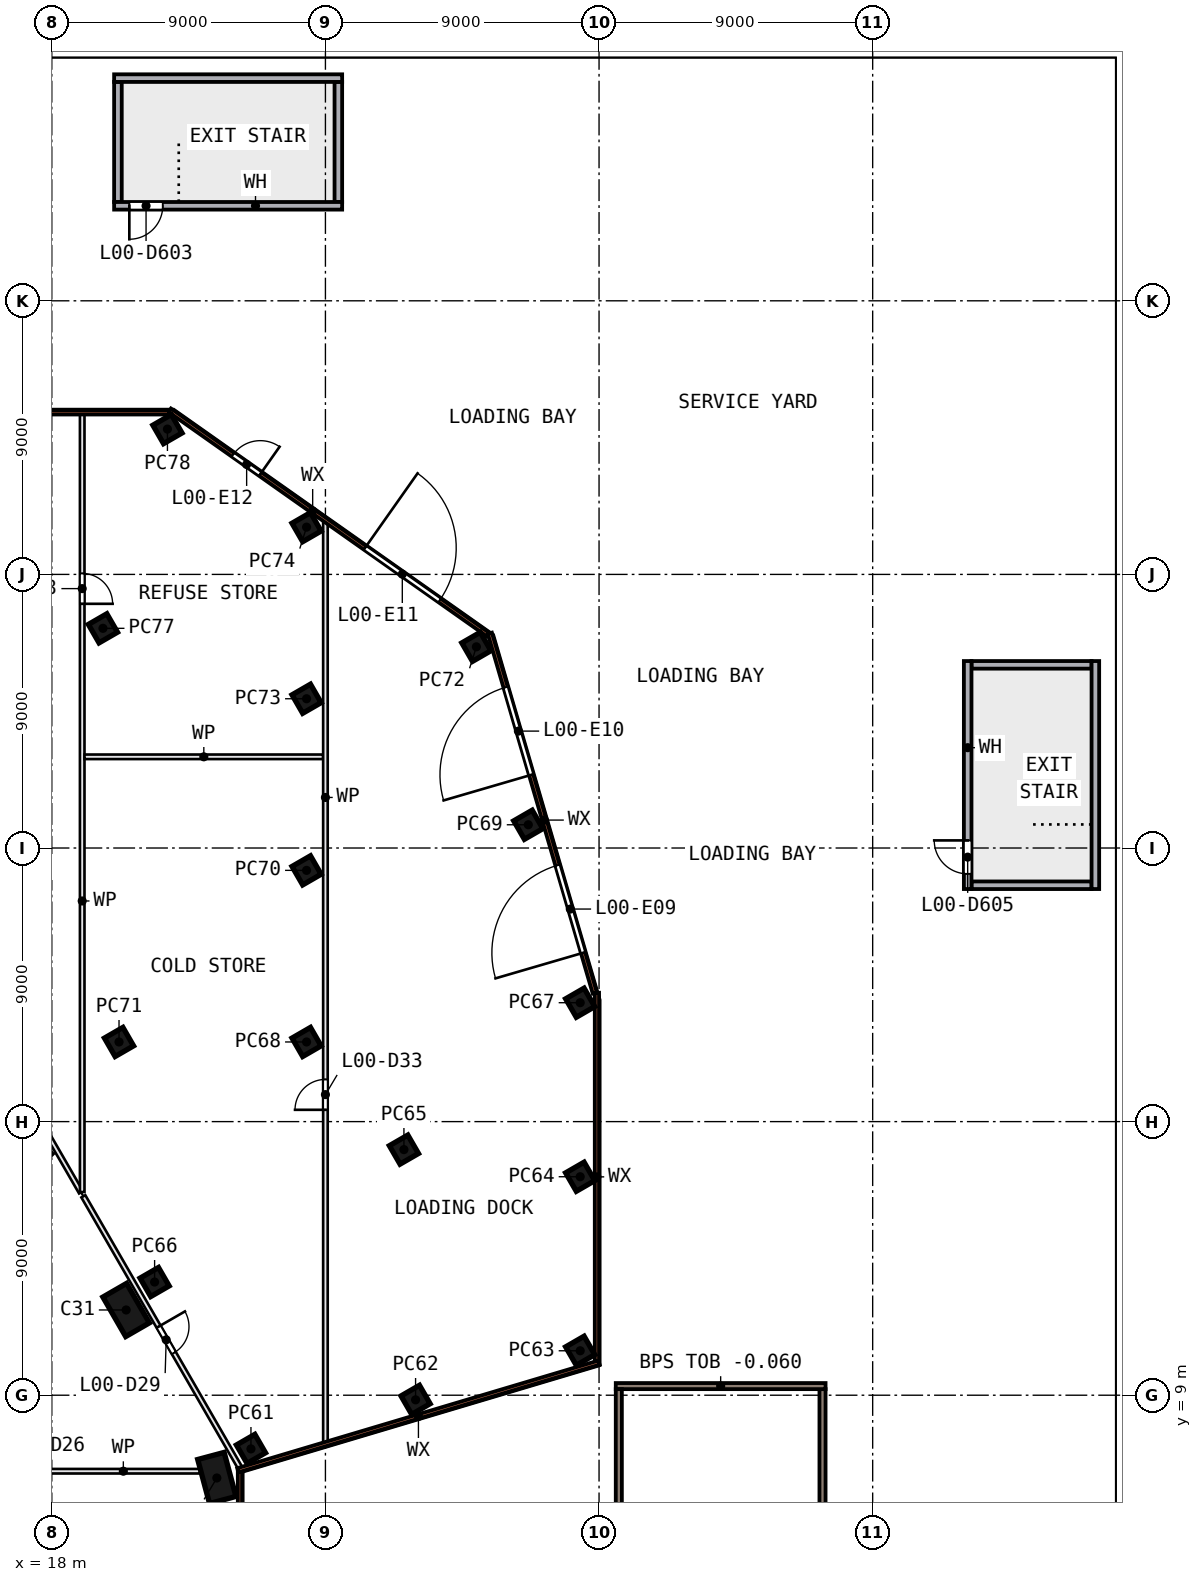
"""IFC4 building model, lengths in metres.
Left out: names, types, materials, properties, quantities, classifications, styles, units other than length and angle.
Written with IfcOpenShell. Run it as: python <this file> out.ifc"""

import sys

from ifc_helpers import new_model, si_unit, direction, frame, frame_2d, origin, origin_2d, place, context, subcontext, project, spatial, rectangle, extrude, element, fill, save


model = new_model("IFC4")
c1 = context("Model", 3, precision=1e-05, world=origin(), true_north=direction((0.0, 1.0)))
c2 = subcontext(c1, "Body", "Model", "MODEL_VIEW")
j1 = project(units=[si_unit("LENGTHUNIT", "METRE"), si_unit("PLANEANGLEUNIT", "RADIAN")], contexts=[c1])
p1 = place(None, origin())
s1 = spatial("IfcSite", under=j1, at=p1, CompositionType="ELEMENT")
p2 = place(p1, origin())
s2 = spatial("IfcBuilding", under=s1, at=p2, CompositionType="ELEMENT")
p3 = place(p2, origin())
s3 = spatial("IfcBuildingStorey", under=s2, at=p3, CompositionType="ELEMENT", Elevation=0.0)
for number, where, z_axis, x_axis in (
    (1, (23.428, 6.278, 0.0), (0.0, 0.0, 1.0), (0.259, -0.966, 0.0)),
    (2, (20.445, 11.804, 0.0), (0.0, 0.0, 1.0), (-0.5, 0.866, 0.0)),
):
    element("IfcColumn", number, at=place(p3, frame(where, z_axis=z_axis, x_axis=x_axis)), inside=s3, PredefinedType="COLUMN", context=c2, shape_type="SweptSolid", body=[
        extrude(rectangle(XDim=1.5, YDim=0.9, at=origin_2d()), origin(), (0.0, 0.0, 1.0), 7.55),
    ])
for number, where, z_axis, x_axis in (
    (3, (24.55, 7.234, 0.0), (0.0, 0.0, 1.0), (0.866, 0.5, 0.0)),
    (4, (29.965, 8.848, 0.0), (0.0, 0.0, 1.0), (0.866, 0.5, 0.0)),
    (5, (35.38, 10.462, 0.0), (0.0, 0.0, 1.0), (0.866, 0.5, 0.0)),
    (6, (35.38, 16.187, 0.0), (0.0, 0.0, 1.0), (0.866, 0.5, 0.0)),
    (7, (29.582, 17.079, 0.0), (0.0, 0.0, 1.0), (0.866, 0.5, 0.0)),
    (8, (21.381, 12.723, 0.0), (0.0, 0.0, 1.0), (0.866, 0.5, 0.0)),
    (9, (35.38, 21.911, 0.0), (0.0, 0.0, 1.0), (0.866, 0.5, 0.0)),
    (10, (26.38, 20.62, 0.0), (0.0, 0.0, 1.0), (0.866, 0.5, 0.0)),
    (11, (33.673, 27.765, 0.0), (0.0, 0.0, 1.0), (0.866, 0.5, 0.0)),
    (12, (26.38, 26.265, 0.0), (0.0, 0.0, 1.0), (0.866, 0.5, 0.0)),
    (13, (20.211, 20.62, 0.0), (0.0, 0.0, 1.0), (0.866, 0.5, 0.0)),
    (14, (31.966, 33.618, 0.0), (0.0, 0.0, 1.0), (0.866, 0.5, 0.0)),
    (15, (26.38, 31.91, 0.0), (0.0, 0.0, 1.0), (0.866, 0.5, 0.0)),
    (16, (26.38, 37.555, 0.0), (0.0, 0.0, 1.0), (0.866, 0.5, 0.0)),
    (17, (19.682, 34.227, 0.0), (0.0, 0.0, 1.0), (0.866, 0.5, 0.0)),
    (18, (21.803, 40.78, 0.0), (0.0, 0.0, 1.0), (0.866, 0.5, 0.0)),
):
    element("IfcColumn", number, at=place(p3, frame(where, z_axis=z_axis, x_axis=x_axis)), inside=s3, PredefinedType="COLUMN", context=c2, shape_type="SweptSolid", body=[
        extrude(rectangle(XDim=0.7, YDim=0.7, at=origin_2d()), origin(), (0.0, 0.0, 1.0), 8.0),
    ])
for number, where, z_axis, x_axis in (
    (19, (36.65, -9.5, -0.06), (0.0, 0.0, 1.0), (0.0, 1.0, 0.0)),
    (20, (43.35, -9.5, -0.06), (0.0, 0.0, 1.0), (0.0, 1.0, 0.0)),
):
    element("IfcWall", number, at=place(p3, frame(where, z_axis=z_axis, x_axis=x_axis)), inside=s3, PredefinedType="PARAPET", context=c2, shape_type="SweptSolid", body=[
        extrude(rectangle(XDim=18.7, YDim=0.2, at=frame_2d((9.35, 0.0))), origin(), (0.0, 0.0, 1.0), 1.18),
    ])
p4 = place(p3, frame((36.55, 9.3, -0.06), z_axis=(0.0, 0.0, 1.0), x_axis=(1.0, 0.0, 0.0)))
e21 = element("IfcWall", 21, at=p4, inside=s3, PredefinedType="PARAPET", context=c2, shape_type="SweptSolid", body=[
    extrude(rectangle(XDim=6.9, YDim=0.2, at=frame_2d((3.45, 0.0))), origin(), (0.0, 0.0, 1.0), 1.18),
])
p5 = place(p3, frame((24.188, 6.479, 0.0), z_axis=(0.0, 0.0, 1.0), x_axis=(0.0, -1.0, 0.0)))
e22 = element("IfcWall", 22, at=p5, inside=s3, PredefinedType="SOLIDWALL", context=c2, shape_type="SweptSolid", body=[
    extrude(rectangle(XDim=13.1, YDim=0.14, at=frame_2d((6.55, 0.0))), origin(), (0.0, 0.0, 1.0), 7.55),
])
p6 = place(p5, frame((9.29, 0.0, 0.0)))
e23 = element("IfcOpeningElement", 23, at=p6, cuts=e22, PredefinedType="OPENING", context=c2, shape_type="SweptSolid", body=[
    extrude(rectangle(XDim=1.1, YDim=2.4, at=frame_2d((0.55, 1.2))), frame((0.0, 0.08, 0.0), z_axis=(0.0, -1.0, 0.0), x_axis=(1.0, 0.0, 0.0)), (0.0, 0.0, 1.0), 0.16),
])
p7 = place(p3, frame((24.118, 6.531, 0.0), z_axis=(0.0, 0.0, 1.0), x_axis=(0.958329382, 0.28566553, 0.0)))
e24 = element("IfcWall", 24, at=p7, inside=s3, PredefinedType="SOLIDWALL", context=c2, shape_type="SweptSolid", body=[
    extrude(rectangle(XDim=12.398, YDim=0.14, at=frame_2d((6.199, 0.0))), origin(), (0.0, 0.0, 1.0), 7.55),
])
p8 = place(p3, frame((35.93, 10.125, 0.0), z_axis=(0.0, 0.0, 1.0), x_axis=(0.0, 1.0, 0.0)))
e25 = element("IfcWall", 25, at=p8, inside=s3, PredefinedType="SOLIDWALL", context=c2, shape_type="SweptSolid", body=[
    extrude(rectangle(XDim=12.115, YDim=0.14, at=frame_2d((6.057, 0.0))), origin(), (0.0, 0.0, 1.0), 7.55),
])
p9 = place(p3, frame((35.86, 22.23, 0.0), z_axis=(0.0, 0.0, 1.0), x_axis=(-0.280008365, 0.95999756, 0.0)))
e26 = element("IfcWall", 26, at=p9, inside=s3, PredefinedType="SOLIDWALL", context=c2, shape_type="SweptSolid", body=[
    extrude(rectangle(XDim=12.328, YDim=0.14, at=frame_2d((6.164, 0.0))), origin(), (0.0, 0.0, 1.0), 7.55),
])
p10 = place(p9, frame((1.377, 0.0, 0.0)))
e27 = element("IfcOpeningElement", 27, at=p10, cuts=e26, PredefinedType="OPENING", context=c2, shape_type="SweptSolid", body=[
    extrude(rectangle(XDim=3.0, YDim=4.6, at=frame_2d((1.5, 2.3))), frame((0.0, 0.08, 0.0), z_axis=(0.0, -1.0, 0.0), x_axis=(1.0, 0.0, 0.0)), (0.0, 0.0, 1.0), 0.16),
])
p11 = place(p9, frame((7.475, 0.0, 0.0)))
e28 = element("IfcOpeningElement", 28, at=p11, cuts=e26, PredefinedType="OPENING", context=c2, shape_type="SweptSolid", body=[
    extrude(rectangle(XDim=3.0, YDim=4.6, at=frame_2d((1.5, 2.3))), frame((0.0, 0.08, 0.0), z_axis=(0.0, -1.0, 0.0), x_axis=(1.0, 0.0, 0.0)), (0.0, 0.0, 1.0), 0.16),
])
p12 = place(p3, frame((21.878, 41.4, 0.0), z_axis=(0.0, 0.0, 1.0), x_axis=(0.817401857, -0.576067881, 0.0)))
e29 = element("IfcWall", 29, at=p12, inside=s3, PredefinedType="SOLIDWALL", context=c2, shape_type="SweptSolid", body=[
    extrude(rectangle(XDim=12.808, YDim=0.14, at=frame_2d((6.404, 0.0))), origin(), (0.0, 0.0, 1.0), 7.55),
])
p13 = place(p12, frame((7.859, 0.0, 0.0)))
e30 = element("IfcOpeningElement", 30, at=p13, cuts=e29, PredefinedType="OPENING", context=c2, shape_type="SweptSolid", body=[
    extrude(rectangle(XDim=3.0, YDim=4.6, at=frame_2d((1.5, 2.3))), frame((0.0, 0.08, 0.0), z_axis=(0.0, -1.0, 0.0), x_axis=(1.0, 0.0, 0.0)), (0.0, 0.0, 1.0), 0.16),
])
p14 = place(p12, frame((2.545, 0.0, 0.0)))
e31 = element("IfcOpeningElement", 31, at=p14, cuts=e29, PredefinedType="OPENING", context=c2, shape_type="SweptSolid", body=[
    extrude(rectangle(XDim=1.1, YDim=2.4, at=frame_2d((0.55, 1.2))), frame((0.0, 0.08, 0.0), z_axis=(0.0, -1.0, 0.0), x_axis=(1.0, 0.0, 0.0)), (0.0, 0.0, 1.0), 0.16),
])
p15 = place(p3, frame((4.7, 41.33, 0.0), z_axis=(0.0, 0.0, 1.0), x_axis=(1.0, 0.0, 0.0)))
e32 = element("IfcWall", 32, at=p15, inside=s3, PredefinedType="SOLIDWALL", context=c2, shape_type="SweptSolid", body=[
    extrude(rectangle(XDim=17.156, YDim=0.14, at=frame_2d((8.578, 0.0))), origin(), (0.0, 0.0, 1.0), 7.55),
])
p16 = place(p15, frame((4.317, 0.0, 0.0)))
e33 = element("IfcOpeningElement", 33, at=p16, cuts=e32, PredefinedType="OPENING", context=c2, shape_type="SweptSolid", body=[
    extrude(rectangle(XDim=1.1, YDim=2.4, at=frame_2d((0.55, 1.2))), frame((0.0, 0.08, 0.0), z_axis=(0.0, -1.0, 0.0), x_axis=(1.0, 0.0, 0.0)), (0.0, 0.0, 1.0), 0.16),
])
p17 = place(p3, frame((17.796, 17.693, 0.0), z_axis=(0.0, 0.0, 1.0), x_axis=(0.50002133, -0.866013088, 0.0)))
e34 = element("IfcWall", 34, at=p17, inside=s3, PredefinedType="PARTITIONING", context=c2, shape_type="SweptSolid", body=[
    extrude(rectangle(XDim=2.333, YDim=0.15, at=frame_2d((1.167, 0.0))), origin(), (0.0, 0.0, 1.0), 7.55),
])
p18 = place(p3, frame((19.0, 41.26, 0.0), z_axis=(0.0, 0.0, 1.0), x_axis=(0.0, -1.0, 0.0)))
e35 = element("IfcWall", 35, at=p18, inside=s3, PredefinedType="PARTITIONING", context=c2, shape_type="SweptSolid", body=[
    extrude(rectangle(XDim=25.577, YDim=0.15, at=frame_2d((12.789, 0.0))), origin(), (0.0, 0.0, 1.0), 7.55),
])
p19 = place(p18, frame((5.227, 0.0, 0.0)))
e36 = element("IfcOpeningElement", 36, at=p19, cuts=e35, PredefinedType="OPENING", context=c2, shape_type="SweptSolid", body=[
    extrude(rectangle(XDim=1.0, YDim=2.1, at=frame_2d((0.5, 1.05))), frame((0.0, 0.085, 0.0), z_axis=(0.0, -1.0, 0.0), x_axis=(1.0, 0.0, 0.0)), (0.0, 0.0, 1.0), 0.17),
])
p20 = place(p3, frame((19.037, 15.543, 0.0), z_axis=(0.0, 0.0, 1.0), x_axis=(0.499986809, -0.866033019, 0.0)))
e37 = element("IfcWall", 37, at=p20, inside=s3, PredefinedType="PARTITIONING", context=c2, shape_type="SweptSolid", body=[
    extrude(rectangle(XDim=10.366, YDim=0.15, at=frame_2d((5.183, 0.0))), origin(), (0.0, 0.0, 1.0), 7.55),
])
p21 = place(p20, frame((4.95, 0.0, 0.0)))
e38 = element("IfcOpeningElement", 38, at=p21, cuts=e37, PredefinedType="OPENING", context=c2, shape_type="SweptSolid", body=[
    extrude(rectangle(XDim=1.0, YDim=2.1, at=frame_2d((0.5, 1.05))), frame((0.0, 0.085, 0.0), z_axis=(0.0, -1.0, 0.0), x_axis=(1.0, 0.0, 0.0)), (0.0, 0.0, 1.0), 0.17),
])
p22 = place(p3, frame((19.075, 30.0, 0.0), z_axis=(0.0, 0.0, 1.0), x_axis=(1.0, 0.0, 0.0)))
e39 = element("IfcWall", 39, at=p22, inside=s3, PredefinedType="PARTITIONING", context=c2, shape_type="SweptSolid", body=[
    extrude(rectangle(XDim=7.85, YDim=0.15, at=frame_2d((3.925, 0.0))), origin(), (0.0, 0.0, 1.0), 7.55),
])
p23 = place(p3, frame((22.872, 6.5, 0.0), z_axis=(0.0, 0.0, 1.0), x_axis=(-1.0, 0.0, 0.0)))
e40 = element("IfcWall", 40, at=p23, inside=s3, PredefinedType="PARTITIONING", context=c2, shape_type="SweptSolid", body=[
    extrude(rectangle(XDim=5.038, YDim=0.15, at=frame_2d((2.519, 0.0))), origin(), (0.0, 0.0, 1.0), 7.55),
])
p24 = place(p3, frame((27.0, 7.402, 0.0), z_axis=(0.0, 0.0, 1.0), x_axis=(0.0, 1.0, 0.0)))
e41 = element("IfcWall", 41, at=p24, inside=s3, PredefinedType="PARTITIONING", context=c2, shape_type="SweptSolid", body=[
    extrude(rectangle(XDim=30.337, YDim=0.15, at=frame_2d((15.168, 0.0))), origin(), (0.0, 0.0, 1.0), 7.55),
])
p25 = place(p24, frame((10.987, 0.0, 0.0)))
e42 = element("IfcOpeningElement", 42, at=p25, cuts=e41, PredefinedType="OPENING", context=c2, shape_type="SweptSolid", body=[
    extrude(rectangle(XDim=1.0, YDim=2.1, at=frame_2d((0.5, 1.05))), frame((0.0, 0.085, 0.0), z_axis=(0.0, -1.0, 0.0), x_axis=(1.0, 0.0, 0.0)), (0.0, 0.0, 1.0), 0.17),
])
p26 = place(p3, frame((20.05, 52.325, 0.0), z_axis=(0.0, 0.0, 1.0), x_axis=(1.0, 0.0, 0.0)))
e43 = element("IfcWall", 43, at=p26, inside=s3, PredefinedType="SOLIDWALL", context=c2, shape_type="SweptSolid", body=[
    extrude(rectangle(XDim=7.5, YDim=0.25, at=frame_2d((3.75, 0.0))), origin(), (0.0, 0.0, 1.0), 3.4),
])
p27 = place(p3, frame((27.55, 48.125, 0.0), z_axis=(0.0, 0.0, 1.0), x_axis=(-1.0, 0.0, 0.0)))
e44 = element("IfcWall", 44, at=p27, inside=s3, PredefinedType="SOLIDWALL", context=c2, shape_type="SweptSolid", body=[
    extrude(rectangle(XDim=7.5, YDim=0.25, at=frame_2d((3.75, 0.0))), origin(), (0.0, 0.0, 1.0), 3.4),
])
p28 = place(p27, frame((5.9, 0.0, 0.0)))
e45 = element("IfcOpeningElement", 45, at=p28, cuts=e44, PredefinedType="OPENING", context=c2, shape_type="SweptSolid", body=[
    extrude(rectangle(XDim=1.1, YDim=2.1, at=frame_2d((0.55, 1.05))), frame((0.0, 0.135, 0.0), z_axis=(0.0, -1.0, 0.0), x_axis=(1.0, 0.0, 0.0)), (0.0, 0.0, 1.0), 0.27),
])
for number, where, z_axis, x_axis in (
    (46, (20.175, 48.25, 0.0), (0.0, 0.0, 1.0), (0.0, 1.0, 0.0)),
    (47, (27.425, 48.25, 0.0), (0.0, 0.0, 1.0), (0.0, 1.0, 0.0)),
):
    element("IfcWall", number, at=place(p3, frame(where, z_axis=z_axis, x_axis=x_axis)), inside=s3, PredefinedType="SOLIDWALL", context=c2, shape_type="SweptSolid", body=[
        extrude(rectangle(XDim=3.95, YDim=0.25, at=frame_2d((1.975, 0.0))), origin(), (0.0, 0.0, 1.0), 3.4),
    ])
p29 = place(p3, frame((48.125, 25.65, 0.0), z_axis=(0.0, 0.0, 1.0), x_axis=(0.0, 1.0, 0.0)))
e48 = element("IfcWall", 48, at=p29, inside=s3, PredefinedType="SOLIDWALL", context=c2, shape_type="SweptSolid", body=[
    extrude(rectangle(XDim=7.5, YDim=0.25, at=frame_2d((3.75, 0.0))), origin(), (0.0, 0.0, 1.0), 3.4),
])
p30 = place(p29, frame((0.5, 0.0, 0.0)))
e49 = element("IfcOpeningElement", 49, at=p30, cuts=e48, PredefinedType="OPENING", context=c2, shape_type="SweptSolid", body=[
    extrude(rectangle(XDim=1.1, YDim=2.1, at=frame_2d((0.55, 1.05))), frame((0.0, 0.135, 0.0), z_axis=(0.0, -1.0, 0.0), x_axis=(1.0, 0.0, 0.0)), (0.0, 0.0, 1.0), 0.27),
])
p31 = place(p3, frame((52.325, 25.65, 0.0), z_axis=(0.0, 0.0, 1.0), x_axis=(0.0, 1.0, 0.0)))
e50 = element("IfcWall", 50, at=p31, inside=s3, PredefinedType="SOLIDWALL", context=c2, shape_type="SweptSolid", body=[
    extrude(rectangle(XDim=7.5, YDim=0.25, at=frame_2d((3.75, 0.0))), origin(), (0.0, 0.0, 1.0), 3.4),
])
for number, where, z_axis, x_axis in (
    (51, (52.2, 25.775, 0.0), (0.0, 0.0, 1.0), (-1.0, 0.0, 0.0)),
    (52, (52.2, 33.025, 0.0), (0.0, 0.0, 1.0), (-1.0, 0.0, 0.0)),
):
    element("IfcWall", number, at=place(p3, frame(where, z_axis=z_axis, x_axis=x_axis)), inside=s3, PredefinedType="SOLIDWALL", context=c2, shape_type="SweptSolid", body=[
        extrude(rectangle(XDim=3.95, YDim=0.25, at=frame_2d((1.975, 0.0))), origin(), (0.0, 0.0, 1.0), 3.4),
    ])
p32 = place(p10, origin())
e53 = element("IfcDoor", 53, at=p32, inside=s3, OperationType="ROLLINGUP", PredefinedType="DOOR", context=c2, shape_type="SweptSolid", body=[
    extrude(rectangle(XDim=3.0, YDim=4.6, at=frame_2d((1.5, 2.3))), frame((0.0, 0.025, 0.0), z_axis=(0.0, -1.0, 0.0), x_axis=(1.0, 0.0, 0.0)), (0.0, 0.0, 1.0), 0.05),
])
fill(e27, e53)
p33 = place(p11, origin())
e54 = element("IfcDoor", 54, at=p33, inside=s3, OperationType="ROLLINGUP", PredefinedType="DOOR", context=c2, shape_type="SweptSolid", body=[
    extrude(rectangle(XDim=3.0, YDim=4.6, at=frame_2d((1.5, 2.3))), frame((0.0, 0.025, 0.0), z_axis=(0.0, -1.0, 0.0), x_axis=(1.0, 0.0, 0.0)), (0.0, 0.0, 1.0), 0.05),
])
fill(e28, e54)
p34 = place(p13, origin())
e55 = element("IfcDoor", 55, at=p34, inside=s3, OperationType="ROLLINGUP", PredefinedType="DOOR", context=c2, shape_type="SweptSolid", body=[
    extrude(rectangle(XDim=3.0, YDim=4.6, at=frame_2d((1.5, 2.3))), frame((0.0, 0.025, 0.0), z_axis=(0.0, -1.0, 0.0), x_axis=(1.0, 0.0, 0.0)), (0.0, 0.0, 1.0), 0.05),
])
fill(e30, e55)
p35 = place(p14, origin())
e56 = element("IfcDoor", 56, at=p35, inside=s3, OperationType="SINGLE_SWING_RIGHT", PredefinedType="DOOR", context=c2, shape_type="SweptSolid", body=[
    extrude(rectangle(XDim=1.1, YDim=2.4, at=frame_2d((0.55, 1.2))), frame((0.0, 0.025, 0.0), z_axis=(0.0, -1.0, 0.0), x_axis=(1.0, 0.0, 0.0)), (0.0, 0.0, 1.0), 0.05),
])
fill(e31, e56)
p36 = place(p19, origin())
e57 = element("IfcDoor", 57, at=p36, inside=s3, OperationType="SINGLE_SWING_RIGHT", PredefinedType="DOOR", context=c2, shape_type="SweptSolid", body=[
    extrude(rectangle(XDim=1.0, YDim=2.1, at=frame_2d((0.5, 1.05))), frame((0.0, 0.025, 0.0), z_axis=(0.0, -1.0, 0.0), x_axis=(1.0, 0.0, 0.0)), (0.0, 0.0, 1.0), 0.05),
])
fill(e36, e57)
p37 = place(p21, origin())
e58 = element("IfcDoor", 58, at=p37, inside=s3, OperationType="SINGLE_SWING_LEFT", PredefinedType="DOOR", context=c2, shape_type="SweptSolid", body=[
    extrude(rectangle(XDim=1.0, YDim=2.1, at=frame_2d((0.5, 1.05))), frame((0.0, 0.025, 0.0), z_axis=(0.0, -1.0, 0.0), x_axis=(1.0, 0.0, 0.0)), (0.0, 0.0, 1.0), 0.05),
])
fill(e38, e58)
p38 = place(p25, origin())
e59 = element("IfcDoor", 59, at=p38, inside=s3, OperationType="SINGLE_SWING_LEFT", PredefinedType="DOOR", context=c2, shape_type="SweptSolid", body=[
    extrude(rectangle(XDim=1.0, YDim=2.1, at=frame_2d((0.5, 1.05))), frame((0.0, 0.025, 0.0), z_axis=(0.0, -1.0, 0.0), x_axis=(1.0, 0.0, 0.0)), (0.0, 0.0, 1.0), 0.05),
])
fill(e42, e59)
p39 = place(p28, origin())
e60 = element("IfcDoor", 60, at=p39, inside=s3, OperationType="SINGLE_SWING_RIGHT", PredefinedType="DOOR", context=c2, shape_type="SweptSolid", body=[
    extrude(rectangle(XDim=1.1, YDim=2.1, at=frame_2d((0.55, 1.05))), frame((0.0, 0.025, 0.0), z_axis=(0.0, -1.0, 0.0), x_axis=(1.0, 0.0, 0.0)), (0.0, 0.0, 1.0), 0.05),
])
fill(e45, e60)
p40 = place(p30, origin())
e61 = element("IfcDoor", 61, at=p40, inside=s3, OperationType="SINGLE_SWING_RIGHT", PredefinedType="DOOR", context=c2, shape_type="SweptSolid", body=[
    extrude(rectangle(XDim=1.1, YDim=2.1, at=frame_2d((0.55, 1.05))), frame((0.0, 0.025, 0.0), z_axis=(0.0, -1.0, 0.0), x_axis=(1.0, 0.0, 0.0)), (0.0, 0.0, 1.0), 0.05),
])
fill(e49, e61)
save(model, sys.argv[1])
